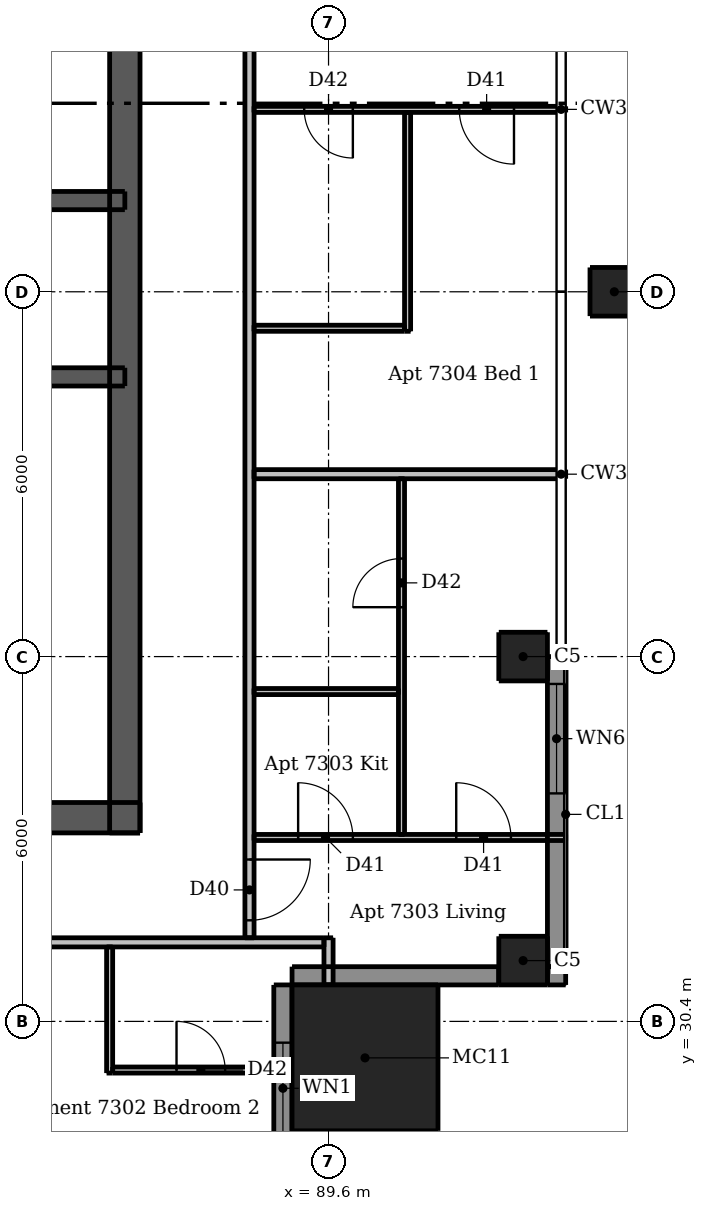
"""IFC4 building model, lengths in metres.
Left out: names, types, materials, properties, quantities, classifications, styles, units other than length and angle.
Written with IfcOpenShell. Run it as: python <this file> out.ifc"""

import sys

from ifc_helpers import new_model, si_unit, direction, frame, frame_2d, origin, origin_2d, place, context, subcontext, project, spatial, rectangle, extrude, element, fill, save


model = new_model("IFC4")
c1 = context("Model", 3, precision=1e-05, world=origin(), true_north=direction((0.0, 1.0)))
c2 = subcontext(c1, "Body", "Model", "MODEL_VIEW")
j1 = project(units=[si_unit("LENGTHUNIT", "METRE"), si_unit("PLANEANGLEUNIT", "RADIAN")], contexts=[c1])
p1 = place(None, origin())
s1 = spatial("IfcSite", under=j1, at=p1, CompositionType="ELEMENT")
p2 = place(p1, origin())
s2 = spatial("IfcBuilding", under=s1, at=p2, CompositionType="ELEMENT")
p3 = place(p2, frame((0.0, 0.0, 271.9)))
s3 = spatial("IfcBuildingStorey", under=s2, at=p3, CompositionType="ELEMENT", Elevation=271.9)
p4 = place(p3, frame((62.5, 33.75, 0.0), z_axis=(0.0, 0.0, 1.0), x_axis=(1.0, 0.0, 0.0)))
e1 = element("IfcWall", 1, at=p4, inside=s3, PredefinedType="SHEAR", context=c2, shape_type="SweptSolid", body=[
    extrude(rectangle(XDim=24.0, YDim=0.5, at=frame_2d((12.0, 0.0))), origin(), (0.0, 0.0, 1.0), 3.05),
])
p5 = place(p4, frame((1.875, 0.0, 0.0)))
e2 = element("IfcOpeningElement", 2, at=p5, cuts=e1, PredefinedType="OPENING", context=c2, shape_type="SweptSolid", body=[
    extrude(rectangle(XDim=1.1, YDim=2.1, at=frame_2d((0.55, 1.05))), frame((0.0, 0.26, 0.0), z_axis=(0.0, -1.0, 0.0), x_axis=(1.0, 0.0, 0.0)), (0.0, 0.0, 1.0), 0.52),
])
p6 = place(p4, frame((21.025, 0.0, 0.0)))
e3 = element("IfcOpeningElement", 3, at=p6, cuts=e1, PredefinedType="OPENING", context=c2, shape_type="SweptSolid", body=[
    extrude(rectangle(XDim=1.1, YDim=2.1, at=frame_2d((0.55, 1.05))), frame((0.0, 0.26, 0.0), z_axis=(0.0, -1.0, 0.0), x_axis=(1.0, 0.0, 0.0)), (0.0, 0.0, 1.0), 0.52),
])
p7 = place(p4, frame((8.0, 0.0, 0.0)))
e4 = element("IfcOpeningElement", 4, at=p7, cuts=e1, PredefinedType="OPENING", context=c2, shape_type="SweptSolid", body=[
    extrude(rectangle(XDim=1.1, YDim=2.1, at=frame_2d((0.55, 1.05))), frame((0.0, 0.26, 0.0), z_axis=(0.0, -1.0, 0.0), x_axis=(1.0, 0.0, 0.0)), (0.0, 0.0, 1.0), 0.52),
])
p8 = place(p4, frame((15.3, 0.0, 0.0)))
e5 = element("IfcOpeningElement", 5, at=p8, cuts=e1, PredefinedType="OPENING", context=c2, shape_type="SweptSolid", body=[
    extrude(rectangle(XDim=0.9, YDim=2.1, at=frame_2d((0.45, 1.05))), frame((0.0, 0.26, 0.0), z_axis=(0.0, -1.0, 0.0), x_axis=(1.0, 0.0, 0.0)), (0.0, 0.0, 1.0), 0.52),
])
p9 = place(p3, frame((86.25, 33.5, 0.0), z_axis=(0.0, 0.0, 1.0), x_axis=(0.0, 1.0, 0.0)))
e6 = element("IfcWall", 6, at=p9, inside=s3, PredefinedType="SHEAR", context=c2, shape_type="SweptSolid", body=[
    extrude(rectangle(XDim=24.0, YDim=0.5, at=frame_2d((12.0, 0.0))), origin(), (0.0, 0.0, 1.0), 3.05),
])
p10 = place(p9, frame((11.2, 0.0, 0.0)))
e7 = element("IfcOpeningElement", 7, at=p10, cuts=e6, PredefinedType="OPENING", context=c2, shape_type="SweptSolid", body=[
    extrude(rectangle(XDim=1.6, YDim=2.1, at=frame_2d((0.8, 1.05))), frame((0.0, 0.26, 0.0), z_axis=(0.0, -1.0, 0.0), x_axis=(1.0, 0.0, 0.0)), (0.0, 0.0, 1.0), 0.52),
])
p11 = place(p3, frame((62.75, 41.0, 0.0), z_axis=(0.0, 0.0, 1.0), x_axis=(1.0, 0.0, 0.0)))
e8 = element("IfcWall", 8, at=p11, inside=s3, PredefinedType="SHEAR", context=c2, shape_type="SweptSolid", body=[
    extrude(rectangle(XDim=23.5, YDim=0.3, at=frame_2d((11.75, 0.0))), origin(), (0.0, 0.0, 1.0), 3.05),
])
p12 = place(p3, frame((62.75, 43.9, 0.0), z_axis=(0.0, 0.0, 1.0), x_axis=(1.0, 0.0, 0.0)))
e9 = element("IfcWall", 9, at=p12, inside=s3, PredefinedType="SHEAR", context=c2, shape_type="SweptSolid", body=[
    extrude(rectangle(XDim=23.5, YDim=0.3, at=frame_2d((11.75, 0.0))), origin(), (0.0, 0.0, 1.0), 3.05),
])
p13 = place(p12, frame((1.725, 0.0, 0.0)))
e10 = element("IfcOpeningElement", 10, at=p13, cuts=e9, PredefinedType="OPENING", context=c2, shape_type="SweptSolid", body=[
    extrude(rectangle(XDim=0.9, YDim=2.1, at=frame_2d((0.45, 1.05))), frame((0.0, 0.16, 0.0), z_axis=(0.0, -1.0, 0.0), x_axis=(1.0, 0.0, 0.0)), (0.0, 0.0, 1.0), 0.32),
])
p14 = place(p12, frame((20.875, 0.0, 0.0)))
e11 = element("IfcOpeningElement", 11, at=p14, cuts=e9, PredefinedType="OPENING", context=c2, shape_type="SweptSolid", body=[
    extrude(rectangle(XDim=0.9, YDim=2.1, at=frame_2d((0.45, 1.05))), frame((0.0, 0.16, 0.0), z_axis=(0.0, -1.0, 0.0), x_axis=(1.0, 0.0, 0.0)), (0.0, 0.0, 1.0), 0.32),
])
p15 = place(p12, frame((7.55, 0.0, 0.0)))
e12 = element("IfcOpeningElement", 12, at=p15, cuts=e9, PredefinedType="OPENING", context=c2, shape_type="SweptSolid", body=[
    extrude(rectangle(XDim=0.9, YDim=2.1, at=frame_2d((0.45, 1.05))), frame((0.0, 0.16, 0.0), z_axis=(0.0, -1.0, 0.0), x_axis=(1.0, 0.0, 0.0)), (0.0, 0.0, 1.0), 0.32),
])
p16 = place(p12, frame((10.05, 0.0, 0.0)))
e13 = element("IfcOpeningElement", 13, at=p16, cuts=e9, PredefinedType="OPENING", context=c2, shape_type="SweptSolid", body=[
    extrude(rectangle(XDim=0.9, YDim=2.1, at=frame_2d((0.45, 1.05))), frame((0.0, 0.16, 0.0), z_axis=(0.0, -1.0, 0.0), x_axis=(1.0, 0.0, 0.0)), (0.0, 0.0, 1.0), 0.32),
])
p17 = place(p12, frame((15.05, 0.0, 0.0)))
e14 = element("IfcOpeningElement", 14, at=p17, cuts=e9, PredefinedType="OPENING", context=c2, shape_type="SweptSolid", body=[
    extrude(rectangle(XDim=0.9, YDim=2.1, at=frame_2d((0.45, 1.05))), frame((0.0, 0.16, 0.0), z_axis=(0.0, -1.0, 0.0), x_axis=(1.0, 0.0, 0.0)), (0.0, 0.0, 1.0), 0.32),
])
p18 = place(p12, frame((17.55, 0.0, 0.0)))
e15 = element("IfcOpeningElement", 15, at=p18, cuts=e9, PredefinedType="OPENING", context=c2, shape_type="SweptSolid", body=[
    extrude(rectangle(XDim=0.9, YDim=2.1, at=frame_2d((0.45, 1.05))), frame((0.0, 0.16, 0.0), z_axis=(0.0, -1.0, 0.0), x_axis=(1.0, 0.0, 0.0)), (0.0, 0.0, 1.0), 0.32),
])
for number, where, z_axis, x_axis in (
    (16, (92.8, 31.4, 0.0), (0.0, 0.0, 1.0), (1.0, 0.0, 0.0)),
    (17, (92.8, 36.4, 0.0), (0.0, 0.0, 1.0), (1.0, 0.0, 0.0)),
    (18, (94.3, 42.4, 0.0), (0.0, 0.0, 1.0), (1.0, 0.0, 0.0)),
):
    element("IfcColumn", number, at=place(p3, frame(where, z_axis=z_axis, x_axis=x_axis)), inside=s3, PredefinedType="COLUMN", context=c2, shape_type="SweptSolid", body=[
        extrude(rectangle(XDim=0.8, YDim=0.8, at=origin_2d()), origin(), (0.0, 0.0, 1.0), 3.05),
    ])
p19 = place(p3, frame((90.2, 29.8, 0.0), z_axis=(0.0, 0.0, 1.0), x_axis=(1.0, 0.0, 0.0)))
e19 = element("IfcColumn", 19, at=p19, inside=s3, PredefinedType="COLUMN", context=c2, shape_type="SweptSolid", body=[
    extrude(rectangle(XDim=2.4, YDim=2.4, at=origin_2d()), origin(), (0.0, 0.0, 1.0), 3.3),
])
p20 = place(p3, frame((88.85, 27.6, 0.0), z_axis=(0.0, 0.0, 1.0), x_axis=(0.0, 1.0, 0.0)))
e20 = element("IfcWall", 20, at=p20, inside=s3, PredefinedType="SOLIDWALL", context=c2, shape_type="SweptSolid", body=[
    extrude(rectangle(XDim=3.4, YDim=0.3, at=frame_2d((1.7, 0.0))), origin(), (0.0, 0.0, 1.0), 3.05),
])
p21 = place(p20, frame((0.95, 0.0, 0.9)))
e21 = element("IfcOpeningElement", 21, at=p21, cuts=e20, PredefinedType="OPENING", context=c2, shape_type="SweptSolid", body=[
    extrude(rectangle(XDim=1.5, YDim=1.5, at=frame_2d((0.75, 0.75))), frame((0.0, 0.16, 0.0), z_axis=(0.0, -1.0, 0.0), x_axis=(1.0, 0.0, 0.0)), (0.0, 0.0, 1.0), 0.32),
])
p22 = place(p3, frame((89.0, 31.15, 0.0), z_axis=(0.0, 0.0, 1.0), x_axis=(1.0, 0.0, 0.0)))
e22 = element("IfcWall", 22, at=p22, inside=s3, PredefinedType="SOLIDWALL", context=c2, shape_type="SweptSolid", body=[
    extrude(rectangle(XDim=3.4, YDim=0.3, at=frame_2d((1.7, 0.0))), origin(), (0.0, 0.0, 1.0), 3.05),
])
p23 = place(p3, frame((93.2, 31.15, 0.0), z_axis=(0.0, 0.0, 1.0), x_axis=(1.0, 0.0, 0.0)))
e23 = element("IfcWall", 23, at=p23, inside=s3, PredefinedType="SOLIDWALL", context=c2, shape_type="SweptSolid", body=[
    extrude(rectangle(XDim=0.3, YDim=0.3, at=frame_2d((0.15, 0.0))), origin(), (0.0, 0.0, 1.0), 3.05),
])
p24 = place(p3, frame((93.35, 31.3, 0.0), z_axis=(0.0, 0.0, 1.0), x_axis=(0.0, 1.0, 0.0)))
e24 = element("IfcWall", 24, at=p24, inside=s3, PredefinedType="SOLIDWALL", context=c2, shape_type="SweptSolid", body=[
    extrude(rectangle(XDim=5.1, YDim=0.3, at=frame_2d((2.55, 0.0))), origin(), (0.0, 0.0, 1.0), 3.05),
])
p25 = place(p24, frame((2.85, 0.0, 0.15)))
e25 = element("IfcOpeningElement", 25, at=p25, cuts=e24, PredefinedType="OPENING", context=c2, shape_type="SweptSolid", body=[
    extrude(rectangle(XDim=1.8, YDim=2.1, at=frame_2d((0.9, 1.05))), frame((0.0, 0.16, 0.0), z_axis=(0.0, -1.0, 0.0), x_axis=(1.0, 0.0, 0.0)), (0.0, 0.0, 1.0), 0.32),
])
p26 = place(p3, frame((86.0, 29.55, 0.0), z_axis=(0.0, 0.0, 1.0), x_axis=(0.0, 1.0, 0.0)))
e26 = element("IfcWall", 26, at=p26, inside=s3, PredefinedType="PARTITIONING", context=c2, shape_type="SweptSolid", body=[
    extrude(rectangle(XDim=2.075, YDim=0.1, at=frame_2d((1.038, 0.0))), origin(), (0.0, 0.0, 1.0), 3.05),
])
p27 = place(p3, frame((90.8, 33.475, 0.0), z_axis=(0.0, 0.0, 1.0), x_axis=(0.0, 1.0, 0.0)))
e27 = element("IfcWall", 27, at=p27, inside=s3, PredefinedType="PARTITIONING", context=c2, shape_type="SweptSolid", body=[
    extrude(rectangle(XDim=5.85, YDim=0.1, at=frame_2d((2.925, 0.0))), origin(), (0.0, 0.0, 1.0), 3.05),
])
p28 = place(p27, frame((3.738, 0.0, 0.0)))
e28 = element("IfcOpeningElement", 28, at=p28, cuts=e27, PredefinedType="OPENING", context=c2, shape_type="SweptSolid", body=[
    extrude(rectangle(XDim=0.8, YDim=2.1, at=frame_2d((0.4, 1.05))), frame((0.0, 0.06, 0.0), z_axis=(0.0, -1.0, 0.0), x_axis=(1.0, 0.0, 0.0)), (0.0, 0.0, 1.0), 0.12),
])
p29 = place(p3, frame((90.9, 41.75, 0.0), z_axis=(0.0, 0.0, 1.0), x_axis=(0.0, 1.0, 0.0)))
e29 = element("IfcWall", 29, at=p29, inside=s3, PredefinedType="PARTITIONING", context=c2, shape_type="SweptSolid", body=[
    extrude(rectangle(XDim=3.6, YDim=0.1, at=frame_2d((1.8, 0.0))), origin(), (0.0, 0.0, 1.0), 3.05),
])
p30 = place(p3, frame((93.5, 45.4, 0.0), z_axis=(0.0, 0.0, 1.0), x_axis=(-1.0, 0.0, 0.0)))
e30 = element("IfcWall", 30, at=p30, inside=s3, PredefinedType="PARTITIONING", context=c2, shape_type="SweptSolid", body=[
    extrude(rectangle(XDim=5.125, YDim=0.1, at=frame_2d((2.562, 0.0))), origin(), (0.0, 0.0, 1.0), 3.05),
])
p31 = place(p30, frame((0.85, 0.0, 0.0)))
e31 = element("IfcOpeningElement", 31, at=p31, cuts=e30, PredefinedType="OPENING", context=c2, shape_type="SweptSolid", body=[
    extrude(rectangle(XDim=0.9, YDim=2.1, at=frame_2d((0.45, 1.05))), frame((0.0, 0.06, 0.0), z_axis=(0.0, -1.0, 0.0), x_axis=(1.0, 0.0, 0.0)), (0.0, 0.0, 1.0), 0.12),
])
p32 = place(p30, frame((3.5, 0.0, 0.0)))
e32 = element("IfcOpeningElement", 32, at=p32, cuts=e30, PredefinedType="OPENING", context=c2, shape_type="SweptSolid", body=[
    extrude(rectangle(XDim=0.8, YDim=2.1, at=frame_2d((0.4, 1.05))), frame((0.0, 0.06, 0.0), z_axis=(0.0, -1.0, 0.0), x_axis=(1.0, 0.0, 0.0)), (0.0, 0.0, 1.0), 0.12),
])
p33 = place(p3, frame((88.375, 41.8, 0.0), z_axis=(0.0, 0.0, 1.0), x_axis=(1.0, 0.0, 0.0)))
e33 = element("IfcWall", 33, at=p33, inside=s3, PredefinedType="PARTITIONING", context=c2, shape_type="SweptSolid", body=[
    extrude(rectangle(XDim=2.475, YDim=0.1, at=frame_2d((1.238, 0.0))), origin(), (0.0, 0.0, 1.0), 3.05),
])
p34 = place(p3, frame((88.375, 35.825, 0.0), z_axis=(0.0, 0.0, 1.0), x_axis=(1.0, 0.0, 0.0)))
e34 = element("IfcWall", 34, at=p34, inside=s3, PredefinedType="PARTITIONING", context=c2, shape_type="SweptSolid", body=[
    extrude(rectangle(XDim=2.375, YDim=0.1, at=frame_2d((1.188, 0.0))), origin(), (0.0, 0.0, 1.0), 3.05),
])
p35 = place(p3, frame((88.375, 33.425, 0.0), z_axis=(0.0, 0.0, 1.0), x_axis=(1.0, 0.0, 0.0)))
e35 = element("IfcWall", 35, at=p35, inside=s3, PredefinedType="PARTITIONING", context=c2, shape_type="SweptSolid", body=[
    extrude(rectangle(XDim=5.125, YDim=0.1, at=frame_2d((2.562, 0.0))), origin(), (0.0, 0.0, 1.0), 3.05),
])
p36 = place(p35, frame((0.725, 0.0, 0.0)))
e36 = element("IfcOpeningElement", 36, at=p36, cuts=e35, PredefinedType="OPENING", context=c2, shape_type="SweptSolid", body=[
    extrude(rectangle(XDim=0.9, YDim=2.1, at=frame_2d((0.45, 1.05))), frame((0.0, 0.06, 0.0), z_axis=(0.0, -1.0, 0.0), x_axis=(1.0, 0.0, 0.0)), (0.0, 0.0, 1.0), 0.12),
])
p37 = place(p35, frame((3.325, 0.0, 0.0)))
e37 = element("IfcOpeningElement", 37, at=p37, cuts=e35, PredefinedType="OPENING", context=c2, shape_type="SweptSolid", body=[
    extrude(rectangle(XDim=0.9, YDim=2.1, at=frame_2d((0.45, 1.05))), frame((0.0, 0.06, 0.0), z_axis=(0.0, -1.0, 0.0), x_axis=(1.0, 0.0, 0.0)), (0.0, 0.0, 1.0), 0.12),
])
p38 = place(p3, frame((86.05, 29.6, 0.0), z_axis=(0.0, 0.0, 1.0), x_axis=(1.0, 0.0, 0.0)))
e38 = element("IfcWall", 38, at=p38, inside=s3, PredefinedType="PARTITIONING", context=c2, shape_type="SweptSolid", body=[
    extrude(rectangle(XDim=2.75, YDim=0.1, at=frame_2d((1.375, 0.0))), origin(), (0.0, 0.0, 1.0), 3.05),
])
p39 = place(p38, frame((1.05, 0.0, 0.0)))
e39 = element("IfcOpeningElement", 39, at=p39, cuts=e38, PredefinedType="OPENING", context=c2, shape_type="SweptSolid", body=[
    extrude(rectangle(XDim=0.8, YDim=2.1, at=frame_2d((0.4, 1.05))), frame((0.0, 0.06, 0.0), z_axis=(0.0, -1.0, 0.0), x_axis=(1.0, 0.0, 0.0)), (0.0, 0.0, 1.0), 0.12),
])
p40 = place(p3, frame((88.3, 61.175, 0.0), z_axis=(0.0, 0.0, 1.0), x_axis=(0.0, -1.0, 0.0)))
e40 = element("IfcWall", 40, at=p40, inside=s3, PredefinedType="PARTITIONING", context=c2, shape_type="SweptSolid", body=[
    extrude(rectangle(XDim=29.4, YDim=0.15, at=frame_2d((14.7, 0.0))), origin(), (0.0, 0.0, 1.0), 3.05),
])
p41 = place(p40, frame((28.113, 0.0, 0.0)))
e41 = element("IfcOpeningElement", 41, at=p41, cuts=e40, PredefinedType="OPENING", context=c2, shape_type="SweptSolid", body=[
    extrude(rectangle(XDim=1.0, YDim=2.1, at=frame_2d((0.5, 1.05))), frame((0.0, 0.085, 0.0), z_axis=(0.0, -1.0, 0.0), x_axis=(1.0, 0.0, 0.0)), (0.0, 0.0, 1.0), 0.17),
])
p42 = place(p40, frame((10.775, 0.0, 0.0)))
e42 = element("IfcOpeningElement", 42, at=p42, cuts=e40, PredefinedType="OPENING", context=c2, shape_type="SweptSolid", body=[
    extrude(rectangle(XDim=1.0, YDim=2.1, at=frame_2d((0.5, 1.05))), frame((0.0, 0.085, 0.0), z_axis=(0.0, -1.0, 0.0), x_axis=(1.0, 0.0, 0.0)), (0.0, 0.0, 1.0), 0.17),
])
p43 = place(p3, frame((89.6, 31.0, 0.0), z_axis=(0.0, 0.0, 1.0), x_axis=(0.0, 1.0, 0.0)))
e43 = element("IfcWall", 43, at=p43, inside=s3, PredefinedType="PARTITIONING", context=c2, shape_type="SweptSolid", body=[
    extrude(rectangle(XDim=0.775, YDim=0.15, at=frame_2d((0.387, 0.0))), origin(), (0.0, 0.0, 1.0), 3.05),
])
p44 = place(p3, frame((88.375, 39.4, 0.0), z_axis=(0.0, 0.0, 1.0), x_axis=(1.0, 0.0, 0.0)))
e44 = element("IfcWall", 44, at=p44, inside=s3, PredefinedType="PARTITIONING", context=c2, shape_type="SweptSolid", body=[
    extrude(rectangle(XDim=5.125, YDim=0.15, at=frame_2d((2.562, 0.0))), origin(), (0.0, 0.0, 1.0), 3.05),
])
p45 = place(p3, frame((89.525, 31.7, 0.0), z_axis=(0.0, 0.0, 1.0), x_axis=(-1.0, 0.0, 0.0)))
e45 = element("IfcWall", 45, at=p45, inside=s3, PredefinedType="PARTITIONING", context=c2, shape_type="SweptSolid", body=[
    extrude(rectangle(XDim=30.55, YDim=0.15, at=frame_2d((15.275, 0.0))), origin(), (0.0, 0.0, 1.0), 3.05),
])
p46 = place(p45, frame((28.275, 0.0, 0.0)))
e46 = element("IfcOpeningElement", 46, at=p46, cuts=e45, PredefinedType="OPENING", context=c2, shape_type="SweptSolid", body=[
    extrude(rectangle(XDim=1.0, YDim=2.1, at=frame_2d((0.5, 1.05))), frame((0.0, 0.085, 0.0), z_axis=(0.0, -1.0, 0.0), x_axis=(1.0, 0.0, 0.0)), (0.0, 0.0, 1.0), 0.17),
])
p47 = place(p45, frame((11.425, 0.0, 0.0)))
e47 = element("IfcOpeningElement", 47, at=p47, cuts=e45, PredefinedType="OPENING", context=c2, shape_type="SweptSolid", body=[
    extrude(rectangle(XDim=1.0, YDim=2.1, at=frame_2d((0.5, 1.05))), frame((0.0, 0.085, 0.0), z_axis=(0.0, -1.0, 0.0), x_axis=(1.0, 0.0, 0.0)), (0.0, 0.0, 1.0), 0.17),
])
p48 = place(p21, origin())
e48 = element("IfcWindow", 48, at=p48, inside=s3, PartitioningType="DOUBLE_PANEL_VERTICAL", PredefinedType="WINDOW", context=c2, shape_type="SweptSolid", body=[
    extrude(rectangle(XDim=1.5, YDim=1.5, at=frame_2d((0.75, 0.75))), frame((0.0, 0.03, 0.0), z_axis=(0.0, -1.0, 0.0), x_axis=(1.0, 0.0, 0.0)), (0.0, 0.0, 1.0), 0.06),
])
fill(e21, e48)
p49 = place(p25, origin())
e49 = element("IfcWindow", 49, at=p49, inside=s3, PartitioningType="DOUBLE_PANEL_VERTICAL", PredefinedType="WINDOW", context=c2, shape_type="SweptSolid", body=[
    extrude(rectangle(XDim=1.8, YDim=2.1, at=frame_2d((0.9, 1.05))), frame((0.0, 0.03, 0.0), z_axis=(0.0, -1.0, 0.0), x_axis=(1.0, 0.0, 0.0)), (0.0, 0.0, 1.0), 0.06),
])
fill(e25, e49)
p50 = place(p10, origin())
e50 = element("IfcDoor", 50, at=p50, inside=s3, OperationType="DOUBLE_DOOR_SINGLE_SWING", PredefinedType="DOOR", context=c2, shape_type="SweptSolid", body=[
    extrude(rectangle(XDim=1.6, YDim=2.1, at=frame_2d((0.8, 1.05))), frame((0.0, 0.237, 0.0), z_axis=(0.0, -1.0, 0.0), x_axis=(1.0, 0.0, 0.0)), (0.0, 0.0, 1.0), 0.05),
])
fill(e7, e50)
p51 = place(p39, origin())
e51 = element("IfcDoor", 51, at=p51, inside=s3, OperationType="SINGLE_SWING_LEFT", PredefinedType="DOOR", context=c2, shape_type="SweptSolid", body=[
    extrude(rectangle(XDim=0.8, YDim=2.1, at=frame_2d((0.4, 1.05))), frame((0.0, 0.025, 0.0), z_axis=(0.0, -1.0, 0.0), x_axis=(1.0, 0.0, 0.0)), (0.0, 0.0, 1.0), 0.05),
])
fill(e39, e51)
p52 = place(p41, origin())
e52 = element("IfcDoor", 52, at=p52, inside=s3, OperationType="SINGLE_SWING_LEFT", PredefinedType="DOOR", context=c2, shape_type="SweptSolid", body=[
    extrude(rectangle(XDim=1.0, YDim=2.1, at=frame_2d((0.5, 1.05))), frame((0.0, 0.025, 0.0), z_axis=(0.0, -1.0, 0.0), x_axis=(1.0, 0.0, 0.0)), (0.0, 0.0, 1.0), 0.05),
])
fill(e41, e52)
p53 = place(p36, origin())
e53 = element("IfcDoor", 53, at=p53, inside=s3, OperationType="SINGLE_SWING_LEFT", PredefinedType="DOOR", context=c2, shape_type="SweptSolid", body=[
    extrude(rectangle(XDim=0.9, YDim=2.1, at=frame_2d((0.45, 1.05))), frame((0.0, 0.025, 0.0), z_axis=(0.0, -1.0, 0.0), x_axis=(1.0, 0.0, 0.0)), (0.0, 0.0, 1.0), 0.05),
])
fill(e36, e53)
p54 = place(p37, origin())
e54 = element("IfcDoor", 54, at=p54, inside=s3, OperationType="SINGLE_SWING_LEFT", PredefinedType="DOOR", context=c2, shape_type="SweptSolid", body=[
    extrude(rectangle(XDim=0.9, YDim=2.1, at=frame_2d((0.45, 1.05))), frame((0.0, 0.025, 0.0), z_axis=(0.0, -1.0, 0.0), x_axis=(1.0, 0.0, 0.0)), (0.0, 0.0, 1.0), 0.05),
])
fill(e37, e54)
p55 = place(p28, origin())
e55 = element("IfcDoor", 55, at=p55, inside=s3, OperationType="SINGLE_SWING_LEFT", PredefinedType="DOOR", context=c2, shape_type="SweptSolid", body=[
    extrude(rectangle(XDim=0.8, YDim=2.1, at=frame_2d((0.4, 1.05))), frame((0.0, 0.025, 0.0), z_axis=(0.0, -1.0, 0.0), x_axis=(1.0, 0.0, 0.0)), (0.0, 0.0, 1.0), 0.05),
])
fill(e28, e55)
p56 = place(p31, origin())
e56 = element("IfcDoor", 56, at=p56, inside=s3, OperationType="SINGLE_SWING_LEFT", PredefinedType="DOOR", context=c2, shape_type="SweptSolid", body=[
    extrude(rectangle(XDim=0.9, YDim=2.1, at=frame_2d((0.45, 1.05))), frame((0.0, 0.025, 0.0), z_axis=(0.0, -1.0, 0.0), x_axis=(1.0, 0.0, 0.0)), (0.0, 0.0, 1.0), 0.05),
])
fill(e31, e56)
p57 = place(p32, origin())
e57 = element("IfcDoor", 57, at=p57, inside=s3, OperationType="SINGLE_SWING_LEFT", PredefinedType="DOOR", context=c2, shape_type="SweptSolid", body=[
    extrude(rectangle(XDim=0.8, YDim=2.1, at=frame_2d((0.4, 1.05))), frame((0.0, 0.025, 0.0), z_axis=(0.0, -1.0, 0.0), x_axis=(1.0, 0.0, 0.0)), (0.0, 0.0, 1.0), 0.05),
])
fill(e32, e57)
save(model, sys.argv[1])
